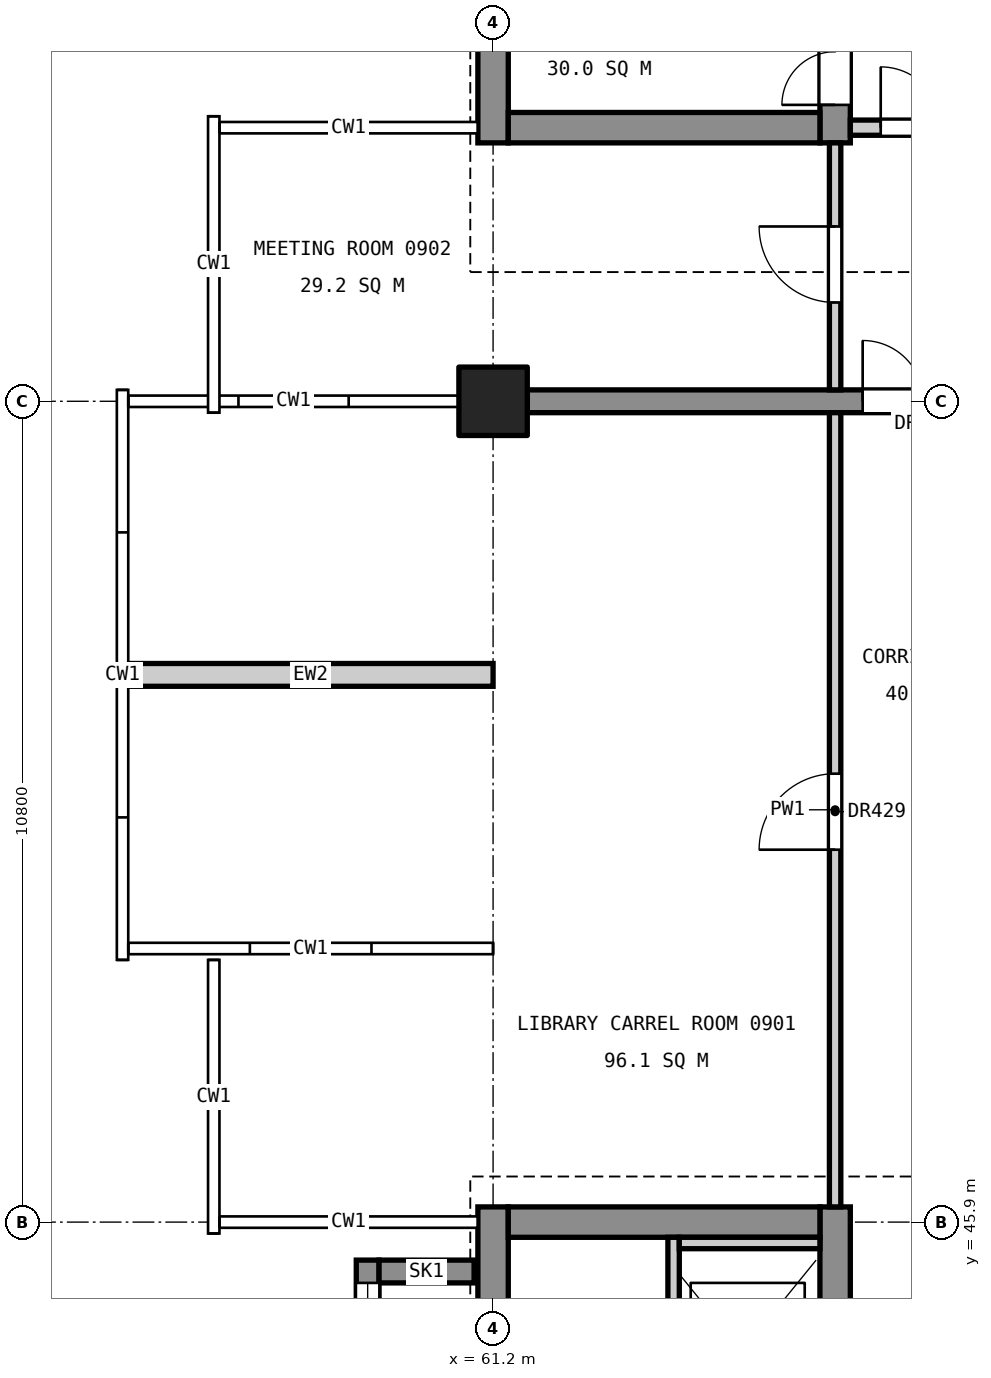
"""IFC4 building model, lengths in metres.
Left out: names, types, materials, properties, quantities, classifications, styles, units other than length and angle.
Written with IfcOpenShell. Run it as: python <this file> out.ifc"""

import sys

from ifc_helpers import new_model, si_unit, direction, frame, frame_2d, origin, origin_2d, place, context, subcontext, project, spatial, rectangle, extrude, element, fill, save


model = new_model("IFC4")
c1 = context("Model", 3, precision=1e-05, world=origin(), true_north=direction((0.0, 1.0)))
c2 = subcontext(c1, "Body", "Model", "MODEL_VIEW")
j1 = project(units=[si_unit("LENGTHUNIT", "METRE"), si_unit("PLANEANGLEUNIT", "RADIAN")], contexts=[c1])
p1 = place(None, origin())
s1 = spatial("IfcSite", under=j1, at=p1, CompositionType="ELEMENT")
p2 = place(p1, origin())
s2 = spatial("IfcBuilding", under=s1, at=p2, CompositionType="ELEMENT")
p3 = place(p2, frame((0.0, 0.0, 46.2)))
s3 = spatial("IfcBuildingStorey", under=s2, at=p3, CompositionType="ELEMENT", Elevation=46.2)
p4 = place(p3, frame((61.2, 56.7, 0.0), z_axis=(0.0, 0.0, 1.0), x_axis=(1.0, 0.0, 0.0)))
e1 = element("IfcColumn", 1, at=p4, inside=s3, PredefinedType="COLUMN", context=c2, shape_type="SweptSolid", body=[
    extrude(rectangle(XDim=0.9, YDim=0.9, at=origin_2d()), origin(), (0.0, 0.0, 1.0), 4.8),
])
p5 = place(p3, frame((61.2, 34.9, 0.0), z_axis=(0.0, 0.0, 1.0), x_axis=(0.0, 1.0, 0.0)))
e2 = element("IfcWall", 2, at=p5, inside=s3, PredefinedType="SHEAR", context=c2, shape_type="SweptSolid", body=[
    extrude(rectangle(XDim=11.2, YDim=0.4, at=frame_2d((5.6, 0.0))), origin(), (0.0, 0.0, 1.0), 4.55),
])
p6 = place(p5, frame((6.11, 0.0, 3.4)))
e3 = element("IfcOpeningElement", 3, at=p6, cuts=e2, PredefinedType="OPENING", context=c2, shape_type="SweptSolid", body=[
    extrude(rectangle(XDim=1.2, YDim=0.9, at=frame_2d((0.6, 0.45))), frame((0.0, 0.21, 0.0), z_axis=(0.0, -1.0, 0.0), x_axis=(1.0, 0.0, 0.0)), (0.0, 0.0, 1.0), 0.42),
])
p7 = place(p3, frame((65.7, 34.9, 0.0), z_axis=(0.0, 0.0, 1.0), x_axis=(0.0, 1.0, 0.0)))
e4 = element("IfcWall", 4, at=p7, inside=s3, PredefinedType="SHEAR", context=c2, shape_type="SweptSolid", body=[
    extrude(rectangle(XDim=11.2, YDim=0.4, at=frame_2d((5.6, 0.0))), origin(), (0.0, 0.0, 1.0), 4.55),
])
p8 = place(p7, frame((0.5, 0.0, 0.0)))
e5 = element("IfcOpeningElement", 5, at=p8, cuts=e4, PredefinedType="OPENING", context=c2, shape_type="SweptSolid", body=[
    extrude(rectangle(XDim=1.4, YDim=2.1, at=frame_2d((0.7, 1.05))), frame((0.0, 0.21, 0.0), z_axis=(0.0, -1.0, 0.0), x_axis=(1.0, 0.0, 0.0)), (0.0, 0.0, 1.0), 0.42),
])
p9 = place(p7, frame((8.75, 0.0, 0.0)))
e6 = element("IfcOpeningElement", 6, at=p9, cuts=e4, PredefinedType="OPENING", context=c2, shape_type="SweptSolid", body=[
    extrude(rectangle(XDim=1.1, YDim=2.1, at=frame_2d((0.55, 1.05))), frame((0.0, 0.21, 0.0), z_axis=(0.0, -1.0, 0.0), x_axis=(1.0, 0.0, 0.0)), (0.0, 0.0, 1.0), 0.42),
])
p10 = place(p3, frame((61.4, 45.9, 0.0), z_axis=(0.0, 0.0, 1.0), x_axis=(1.0, 0.0, 0.0)))
e7 = element("IfcWall", 7, at=p10, inside=s3, PredefinedType="SHEAR", context=c2, shape_type="SweptSolid", body=[
    extrude(rectangle(XDim=4.1, YDim=0.4, at=frame_2d((2.05, 0.0))), origin(), (0.0, 0.0, 1.0), 4.55),
])
p11 = place(p3, frame((61.2, 60.1, 0.0), z_axis=(0.0, 0.0, 1.0), x_axis=(0.0, 1.0, 0.0)))
e8 = element("IfcWall", 8, at=p11, inside=s3, PredefinedType="SHEAR", context=c2, shape_type="SweptSolid", body=[
    extrude(rectangle(XDim=14.8, YDim=0.4, at=frame_2d((7.4, 0.0))), origin(), (0.0, 0.0, 1.0), 4.55),
])
p12 = place(p11, frame((6.11, 0.0, 3.4)))
e9 = element("IfcOpeningElement", 9, at=p12, cuts=e8, PredefinedType="OPENING", context=c2, shape_type="SweptSolid", body=[
    extrude(rectangle(XDim=1.2, YDim=0.9, at=frame_2d((0.6, 0.45))), frame((0.0, 0.21, 0.0), z_axis=(0.0, -1.0, 0.0), x_axis=(1.0, 0.0, 0.0)), (0.0, 0.0, 1.0), 0.42),
])
p13 = place(p3, frame((65.7, 60.1, 0.0), z_axis=(0.0, 0.0, 1.0), x_axis=(0.0, 1.0, 0.0)))
e10 = element("IfcWall", 10, at=p13, inside=s3, PredefinedType="SHEAR", context=c2, shape_type="SweptSolid", body=[
    extrude(rectangle(XDim=14.8, YDim=0.4, at=frame_2d((7.4, 0.0))), origin(), (0.0, 0.0, 1.0), 4.55),
])
p14 = place(p13, frame((0.5, 0.0, 0.0)))
e11 = element("IfcOpeningElement", 11, at=p14, cuts=e10, PredefinedType="OPENING", context=c2, shape_type="SweptSolid", body=[
    extrude(rectangle(XDim=1.4, YDim=2.1, at=frame_2d((0.7, 1.05))), frame((0.0, 0.21, 0.0), z_axis=(0.0, -1.0, 0.0), x_axis=(1.0, 0.0, 0.0)), (0.0, 0.0, 1.0), 0.42),
])
p15 = place(p13, frame((8.8, 0.0, 0.0)))
e12 = element("IfcOpeningElement", 12, at=p15, cuts=e10, PredefinedType="OPENING", context=c2, shape_type="SweptSolid", body=[
    extrude(rectangle(XDim=1.1, YDim=2.1, at=frame_2d((0.55, 1.05))), frame((0.0, 0.21, 0.0), z_axis=(0.0, -1.0, 0.0), x_axis=(1.0, 0.0, 0.0)), (0.0, 0.0, 1.0), 0.42),
])
p16 = place(p13, frame((11.35, 0.0, 0.0)))
e13 = element("IfcOpeningElement", 13, at=p16, cuts=e10, PredefinedType="OPENING", context=c2, shape_type="SweptSolid", body=[
    extrude(rectangle(XDim=1.1, YDim=2.1, at=frame_2d((0.55, 1.05))), frame((0.0, 0.21, 0.0), z_axis=(0.0, -1.0, 0.0), x_axis=(1.0, 0.0, 0.0)), (0.0, 0.0, 1.0), 0.42),
])
p17 = place(p3, frame((61.4, 60.3, 0.0), z_axis=(0.0, 0.0, 1.0), x_axis=(1.0, 0.0, 0.0)))
e14 = element("IfcWall", 14, at=p17, inside=s3, PredefinedType="SHEAR", context=c2, shape_type="SweptSolid", body=[
    extrude(rectangle(XDim=4.1, YDim=0.4, at=frame_2d((2.05, 0.0))), origin(), (0.0, 0.0, 1.0), 4.55),
])
p18 = place(p3, frame((59.55, 43.0, 0.0), z_axis=(0.0, 0.0, 1.0), x_axis=(0.0, 1.0, 0.0)))
e15 = element("IfcWall", 15, at=p18, inside=s3, PredefinedType="SHEAR", context=c2, shape_type="SweptSolid", body=[
    extrude(rectangle(XDim=2.4, YDim=0.3, at=frame_2d((1.2, 0.0))), origin(), (0.0, 0.0, 1.0), 4.8),
])
p19 = place(p18, frame((0.3, 0.0, 3.0)))
e16 = element("IfcOpeningElement", 16, at=p19, cuts=e15, PredefinedType="OPENING", context=c2, shape_type="SweptSolid", body=[
    extrude(rectangle(XDim=1.8, YDim=1.2, at=frame_2d((0.9, 0.6))), frame((0.0, 0.16, 0.0), z_axis=(0.0, -1.0, 0.0), x_axis=(1.0, 0.0, 0.0)), (0.0, 0.0, 1.0), 0.32),
])
p20 = place(p3, frame((60.95, 45.25, 0.0), z_axis=(0.0, 0.0, 1.0), x_axis=(-1.0, 0.0, 0.0)))
e17 = element("IfcWall", 17, at=p20, inside=s3, PredefinedType="SHEAR", context=c2, shape_type="SweptSolid", body=[
    extrude(rectangle(XDim=1.25, YDim=0.3, at=frame_2d((0.625, 0.0))), origin(), (0.0, 0.0, 1.0), 4.8),
])
p21 = place(p3, frame((61.65, 56.7, 0.0), z_axis=(0.0, 0.0, 1.0), x_axis=(1.0, 0.0, 0.0)))
e18 = element("IfcWall", 18, at=p21, inside=s3, PredefinedType="SHEAR", context=c2, shape_type="SweptSolid", body=[
    extrude(rectangle(XDim=6.3, YDim=0.3, at=frame_2d((3.15, 0.0))), origin(), (0.0, 0.0, 1.0), 4.55),
])
p22 = place(p21, frame((4.413, 0.0, 0.0)))
e19 = element("IfcOpeningElement", 19, at=p22, cuts=e18, PredefinedType="OPENING", context=c2, shape_type="SweptSolid", body=[
    extrude(rectangle(XDim=1.6, YDim=2.1, at=frame_2d((0.8, 1.05))), frame((0.0, 0.16, 0.0), z_axis=(0.0, -1.0, 0.0), x_axis=(1.0, 0.0, 0.0)), (0.0, 0.0, 1.0), 0.32),
])
p23 = place(p3, frame((63.575, 43.0, 0.0), z_axis=(0.0, 0.0, 1.0), x_axis=(0.0, 1.0, 0.0)))
e20 = element("IfcWall", 20, at=p23, inside=s3, PredefinedType="SOLIDWALL", context=c2, shape_type="SweptSolid", body=[
    extrude(rectangle(XDim=2.7, YDim=0.15, at=frame_2d((1.35, 0.0))), origin(), (0.0, 0.0, 1.0), 4.8),
])
p24 = place(p3, frame((63.65, 45.625, 0.0), z_axis=(0.0, 0.0, 1.0), x_axis=(1.0, 0.0, 0.0)))
e21 = element("IfcWall", 21, at=p24, inside=s3, PredefinedType="SOLIDWALL", context=c2, shape_type="SweptSolid", body=[
    extrude(rectangle(XDim=1.85, YDim=0.15, at=frame_2d((0.925, 0.0))), origin(), (0.0, 0.0, 1.0), 4.8),
])
p25 = place(p3, frame((56.4, 53.1, 0.0), z_axis=(0.0, 0.0, 1.0), x_axis=(1.0, 0.0, 0.0)))
e22 = element("IfcWall", 22, at=p25, inside=s3, PredefinedType="STANDARD", context=c2, shape_type="SweptSolid", body=[
    extrude(rectangle(XDim=4.8, YDim=0.3, at=frame_2d((2.4, 0.0))), origin(), (0.0, 0.0, 1.0), 3.65),
])
p26 = place(p3, frame((65.7, 46.1, 0.0), z_axis=(0.0, 0.0, 1.0), x_axis=(0.0, 1.0, 0.0)))
e23 = element("IfcWall", 23, at=p26, inside=s3, PredefinedType="PARTITIONING", context=c2, shape_type="SweptSolid", body=[
    extrude(rectangle(XDim=10.45, YDim=0.15, at=frame_2d((5.225, 0.0))), origin(), (0.0, 0.0, 1.0), 3.55),
])
p27 = place(p26, frame((4.7, 0.0, 0.0)))
e24 = element("IfcOpeningElement", 24, at=p27, cuts=e23, PredefinedType="OPENING", context=c2, shape_type="SweptSolid", body=[
    extrude(rectangle(XDim=1.0, YDim=2.1, at=frame_2d((0.5, 1.05))), frame((0.0, 0.085, 0.0), z_axis=(0.0, -1.0, 0.0), x_axis=(1.0, 0.0, 0.0)), (0.0, 0.0, 1.0), 0.17),
])
p28 = place(p3, frame((65.7, 56.85, 0.0), z_axis=(0.0, 0.0, 1.0), x_axis=(0.0, 1.0, 0.0)))
e25 = element("IfcWall", 25, at=p28, inside=s3, PredefinedType="PARTITIONING", context=c2, shape_type="SweptSolid", body=[
    extrude(rectangle(XDim=3.25, YDim=0.15, at=frame_2d((1.625, 0.0))), origin(), (0.0, 0.0, 1.0), 3.55),
])
p29 = place(p28, frame((1.15, 0.0, 0.0)))
e26 = element("IfcOpeningElement", 26, at=p29, cuts=e25, PredefinedType="OPENING", context=c2, shape_type="SweptSolid", body=[
    extrude(rectangle(XDim=1.0, YDim=2.1, at=frame_2d((0.5, 1.05))), frame((0.0, 0.085, 0.0), z_axis=(0.0, -1.0, 0.0), x_axis=(1.0, 0.0, 0.0)), (0.0, 0.0, 1.0), 0.17),
])
p30 = place(p3, frame((65.9, 60.3, 0.0), z_axis=(0.0, 0.0, 1.0), x_axis=(1.0, 0.0, 0.0)))
e27 = element("IfcWall", 27, at=p30, inside=s3, PredefinedType="PARTITIONING", context=c2, shape_type="SweptSolid", body=[
    extrude(rectangle(XDim=2.4, YDim=0.2, at=frame_2d((1.2, 0.0))), origin(), (0.0, 0.0, 1.0), 3.85),
])
p31 = place(p30, frame((0.4, 0.0, 0.0)))
e28 = element("IfcOpeningElement", 28, at=p31, cuts=e27, PredefinedType="OPENING", context=c2, shape_type="SweptSolid", body=[
    extrude(rectangle(XDim=1.6, YDim=2.1, at=frame_2d((0.8, 1.05))), frame((0.0, 0.11, 0.0), z_axis=(0.0, -1.0, 0.0), x_axis=(1.0, 0.0, 0.0)), (0.0, 0.0, 1.0), 0.22),
])
p32 = place(p14, origin())
e29 = element("IfcDoor", 29, at=p32, inside=s3, OperationType="DOUBLE_DOOR_SINGLE_SWING", PredefinedType="DOOR", context=c2, shape_type="SweptSolid", body=[
    extrude(rectangle(XDim=1.4, YDim=2.1, at=frame_2d((0.7, 1.05))), frame((0.0, 0.025, 0.0), z_axis=(0.0, -1.0, 0.0), x_axis=(1.0, 0.0, 0.0)), (0.0, 0.0, 1.0), 0.05),
])
fill(e11, e29)
p33 = place(p19, origin())
e30 = element("IfcWindow", 30, at=p33, inside=s3, PartitioningType="SINGLE_PANEL", PredefinedType="WINDOW", context=c2, shape_type="SweptSolid", body=[
    extrude(rectangle(XDim=1.8, YDim=1.2, at=frame_2d((0.9, 0.6))), frame((0.0, 0.03, 0.0), z_axis=(0.0, -1.0, 0.0), x_axis=(1.0, 0.0, 0.0)), (0.0, 0.0, 1.0), 0.06),
])
fill(e16, e30)
p34 = place(p27, origin())
e31 = element("IfcDoor", 31, at=p34, inside=s3, OperationType="SINGLE_SWING_LEFT", PredefinedType="DOOR", context=c2, shape_type="SweptSolid", body=[
    extrude(rectangle(XDim=1.0, YDim=2.1, at=frame_2d((0.5, 1.05))), frame((0.0, 0.025, 0.0), z_axis=(0.0, -1.0, 0.0), x_axis=(1.0, 0.0, 0.0)), (0.0, 0.0, 1.0), 0.05),
])
fill(e24, e31)
p35 = place(p29, origin())
e32 = element("IfcDoor", 32, at=p35, inside=s3, OperationType="SINGLE_SWING_RIGHT", PredefinedType="DOOR", context=c2, shape_type="SweptSolid", body=[
    extrude(rectangle(XDim=1.0, YDim=2.1, at=frame_2d((0.5, 1.05))), frame((0.0, 0.025, 0.0), z_axis=(0.0, -1.0, 0.0), x_axis=(1.0, 0.0, 0.0)), (0.0, 0.0, 1.0), 0.05),
])
fill(e26, e32)
p36 = place(p31, origin())
e33 = element("IfcDoor", 33, at=p36, inside=s3, OperationType="DOUBLE_DOOR_SINGLE_SWING", PredefinedType="DOOR", context=c2, shape_type="SweptSolid", body=[
    extrude(rectangle(XDim=1.6, YDim=2.1, at=frame_2d((0.8, 1.05))), frame((0.0, 0.025, 0.0), z_axis=(0.0, -1.0, 0.0), x_axis=(1.0, 0.0, 0.0)), (0.0, 0.0, 1.0), 0.05),
])
fill(e28, e33)
p37 = place(p22, origin())
e34 = element("IfcDoor", 34, at=p37, inside=s3, OperationType="DOUBLE_DOOR_SINGLE_SWING", PredefinedType="DOOR", context=c2, shape_type="SweptSolid", body=[
    extrude(rectangle(XDim=1.6, YDim=2.1, at=frame_2d((0.8, 1.05))), frame((0.0, 0.025, 0.0), z_axis=(0.0, -1.0, 0.0), x_axis=(1.0, 0.0, 0.0)), (0.0, 0.0, 1.0), 0.05),
])
fill(e19, e34)
save(model, sys.argv[1])
